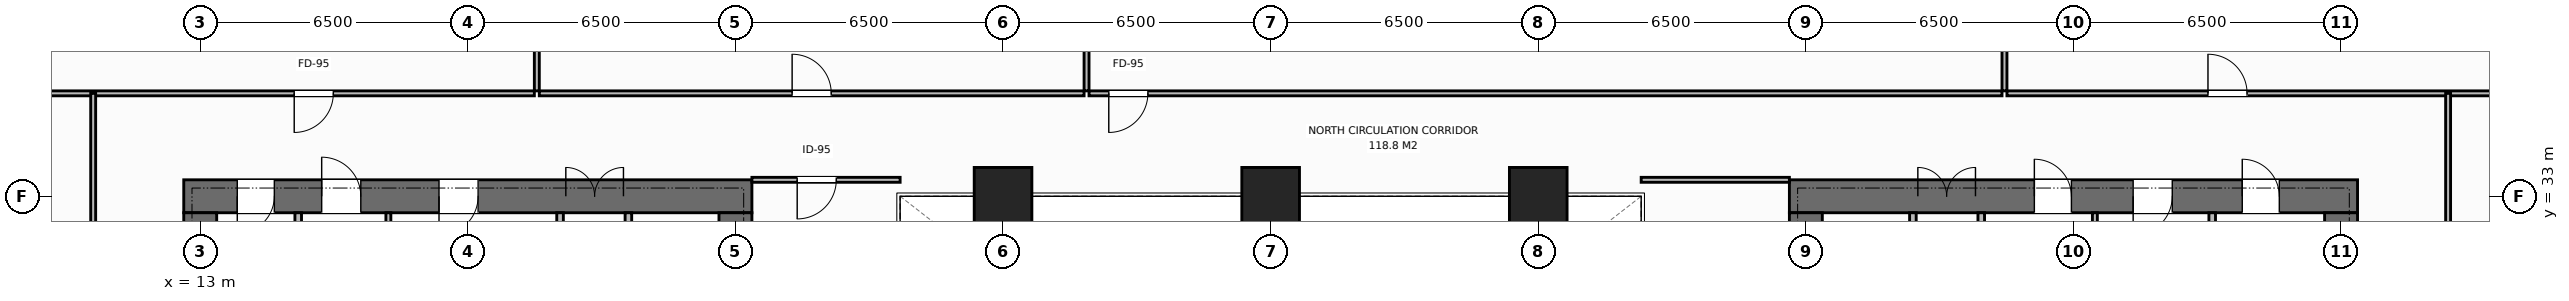
"""IFC4 building model, lengths in metres.
Left out: names, types, materials, properties, quantities, classifications, styles, units other than length and angle.
Written with IfcOpenShell. Run it as: python <this file> out.ifc"""

import sys

from ifc_helpers import new_model, si_unit, direction, frame, frame_2d, origin, origin_2d, place, context, subcontext, project, spatial, rectangle, extrude, element, fill, save


model = new_model("IFC4")
c1 = context("Model", 3, precision=1e-05, world=origin(), true_north=direction((0.0, 1.0)))
c2 = subcontext(c1, "Body", "Model", "MODEL_VIEW")
j1 = project(units=[si_unit("LENGTHUNIT", "METRE"), si_unit("PLANEANGLEUNIT", "RADIAN")], contexts=[c1])
p1 = place(None, origin())
s1 = spatial("IfcSite", under=j1, at=p1, CompositionType="ELEMENT")
p2 = place(p1, origin())
s2 = spatial("IfcBuilding", under=s1, at=p2, CompositionType="ELEMENT")
p3 = place(p2, frame((0.0, 0.0, 69.6)))
s3 = spatial("IfcBuildingStorey", under=s2, at=p3, CompositionType="ELEMENT", Elevation=69.6)
p4 = place(p3, frame((12.6, 33.0, 0.0), z_axis=(0.0, 0.0, 1.0), x_axis=(1.0, 0.0, 0.0)))
e1 = element("IfcWall", 1, at=p4, inside=s3, PredefinedType="SHEAR", context=c2, shape_type="SweptSolid", body=[
    extrude(rectangle(XDim=13.8, YDim=0.8, at=frame_2d((6.9, 0.0))), origin(), (0.0, 0.0, 1.0), 3.8),
])
p5 = place(p4, frame((1.3, 0.0, 0.0)))
e2 = element("IfcOpeningElement", 2, at=p5, cuts=e1, PredefinedType="OPENING", context=c2, shape_type="SweptSolid", body=[
    extrude(rectangle(XDim=0.9, YDim=2.15, at=frame_2d((0.45, 1.075))), frame((0.0, 0.41, 0.0), z_axis=(0.0, -1.0, 0.0), x_axis=(1.0, 0.0, 0.0)), (0.0, 0.0, 1.0), 0.82),
])
p6 = place(p4, frame((3.35, 0.0, 0.0)))
e3 = element("IfcOpeningElement", 3, at=p6, cuts=e1, PredefinedType="OPENING", context=c2, shape_type="SweptSolid", body=[
    extrude(rectangle(XDim=0.95, YDim=2.15, at=frame_2d((0.475, 1.075))), frame((0.0, 0.41, 0.0), z_axis=(0.0, -1.0, 0.0), x_axis=(1.0, 0.0, 0.0)), (0.0, 0.0, 1.0), 0.82),
])
p7 = place(p4, frame((6.2, 0.0, 0.0)))
e4 = element("IfcOpeningElement", 4, at=p7, cuts=e1, PredefinedType="OPENING", context=c2, shape_type="SweptSolid", body=[
    extrude(rectangle(XDim=0.95, YDim=2.15, at=frame_2d((0.475, 1.075))), frame((0.0, 0.41, 0.0), z_axis=(0.0, -1.0, 0.0), x_axis=(1.0, 0.0, 0.0)), (0.0, 0.0, 1.0), 0.82),
])
p8 = place(p4, frame((9.28, 0.0, 0.0)))
e5 = element("IfcOpeningElement", 5, at=p8, cuts=e1, PredefinedType="OPENING", context=c2, shape_type="SweptSolid", body=[
    extrude(rectangle(XDim=1.4, YDim=2.2, at=frame_2d((0.7, 1.1))), frame((0.0, 0.41, 0.0), z_axis=(0.0, -1.0, 0.0), x_axis=(1.0, 0.0, 0.0)), (0.0, 0.0, 1.0), 0.82),
])
p9 = place(p3, frame((13.0, 19.4, 0.0), z_axis=(0.0, 0.0, 1.0), x_axis=(0.0, 1.0, 0.0)))
e6 = element("IfcWall", 6, at=p9, inside=s3, PredefinedType="SHEAR", context=c2, shape_type="SweptSolid", body=[
    extrude(rectangle(XDim=13.2, YDim=0.8, at=frame_2d((6.6, 0.0))), origin(), (0.0, 0.0, 1.0), 3.8),
])
p10 = place(p9, frame((4.65, 0.0, 0.0)))
e7 = element("IfcOpeningElement", 7, at=p10, cuts=e6, PredefinedType="OPENING", context=c2, shape_type="SweptSolid", body=[
    extrude(rectangle(XDim=1.4, YDim=2.2, at=frame_2d((0.7, 1.1))), frame((0.0, 0.41, 0.0), z_axis=(0.0, -1.0, 0.0), x_axis=(1.0, 0.0, 0.0)), (0.0, 0.0, 1.0), 0.82),
])
p11 = place(p3, frame((26.0, 19.4, 0.0), z_axis=(0.0, 0.0, 1.0), x_axis=(0.0, 1.0, 0.0)))
e8 = element("IfcWall", 8, at=p11, inside=s3, PredefinedType="SHEAR", context=c2, shape_type="SweptSolid", body=[
    extrude(rectangle(XDim=13.2, YDim=0.8, at=frame_2d((6.6, 0.0))), origin(), (0.0, 0.0, 1.0), 3.8),
])
p12 = place(p3, frame((51.6, 33.0, 0.0), z_axis=(0.0, 0.0, 1.0), x_axis=(1.0, 0.0, 0.0)))
e9 = element("IfcWall", 9, at=p12, inside=s3, PredefinedType="SHEAR", context=c2, shape_type="SweptSolid", body=[
    extrude(rectangle(XDim=13.8, YDim=0.8, at=frame_2d((6.9, 0.0))), origin(), (0.0, 0.0, 1.0), 3.8),
])
p13 = place(p12, frame((3.12, 0.0, 0.0)))
e10 = element("IfcOpeningElement", 10, at=p13, cuts=e9, PredefinedType="OPENING", context=c2, shape_type="SweptSolid", body=[
    extrude(rectangle(XDim=1.4, YDim=2.2, at=frame_2d((0.7, 1.1))), frame((0.0, 0.41, 0.0), z_axis=(0.0, -1.0, 0.0), x_axis=(1.0, 0.0, 0.0)), (0.0, 0.0, 1.0), 0.82),
])
p14 = place(p12, frame((11.0, 0.0, 0.0)))
e11 = element("IfcOpeningElement", 11, at=p14, cuts=e9, PredefinedType="OPENING", context=c2, shape_type="SweptSolid", body=[
    extrude(rectangle(XDim=0.9, YDim=2.15, at=frame_2d((0.45, 1.075))), frame((0.0, 0.41, 0.0), z_axis=(0.0, -1.0, 0.0), x_axis=(1.0, 0.0, 0.0)), (0.0, 0.0, 1.0), 0.82),
])
p15 = place(p12, frame((5.95, 0.0, 0.0)))
e12 = element("IfcOpeningElement", 12, at=p15, cuts=e9, PredefinedType="OPENING", context=c2, shape_type="SweptSolid", body=[
    extrude(rectangle(XDim=0.9, YDim=2.15, at=frame_2d((0.45, 1.075))), frame((0.0, 0.41, 0.0), z_axis=(0.0, -1.0, 0.0), x_axis=(1.0, 0.0, 0.0)), (0.0, 0.0, 1.0), 0.82),
])
p16 = place(p12, frame((8.35, 0.0, 0.0)))
e13 = element("IfcOpeningElement", 13, at=p16, cuts=e9, PredefinedType="OPENING", context=c2, shape_type="SweptSolid", body=[
    extrude(rectangle(XDim=0.95, YDim=2.15, at=frame_2d((0.475, 1.075))), frame((0.0, 0.41, 0.0), z_axis=(0.0, -1.0, 0.0), x_axis=(1.0, 0.0, 0.0)), (0.0, 0.0, 1.0), 0.82),
])
p17 = place(p3, frame((52.0, 19.4, 0.0), z_axis=(0.0, 0.0, 1.0), x_axis=(0.0, 1.0, 0.0)))
e14 = element("IfcWall", 14, at=p17, inside=s3, PredefinedType="SHEAR", context=c2, shape_type="SweptSolid", body=[
    extrude(rectangle(XDim=13.2, YDim=0.8, at=frame_2d((6.6, 0.0))), origin(), (0.0, 0.0, 1.0), 3.8),
])
p18 = place(p3, frame((65.0, 19.4, 0.0), z_axis=(0.0, 0.0, 1.0), x_axis=(0.0, 1.0, 0.0)))
e15 = element("IfcWall", 15, at=p18, inside=s3, PredefinedType="SHEAR", context=c2, shape_type="SweptSolid", body=[
    extrude(rectangle(XDim=13.2, YDim=0.8, at=frame_2d((6.6, 0.0))), origin(), (0.0, 0.0, 1.0), 3.8),
])
p19 = place(p18, frame((8.05, 0.0, 0.0)))
e16 = element("IfcOpeningElement", 16, at=p19, cuts=e15, PredefinedType="OPENING", context=c2, shape_type="SweptSolid", body=[
    extrude(rectangle(XDim=1.3, YDim=2.2, at=frame_2d((0.65, 1.1))), frame((0.0, 0.41, 0.0), z_axis=(0.0, -1.0, 0.0), x_axis=(1.0, 0.0, 0.0)), (0.0, 0.0, 1.0), 0.82),
])
for number, where, z_axis, x_axis in (
    (17, (32.5, 33.0, 0.0), (0.0, 0.0, 1.0), (1.0, 0.0, 0.0)),
    (18, (39.0, 33.0, 0.0), (0.0, 0.0, 1.0), (1.0, 0.0, 0.0)),
    (19, (45.5, 33.0, 0.0), (0.0, 0.0, 1.0), (1.0, 0.0, 0.0)),
):
    element("IfcColumn", number, at=place(p3, frame(where, z_axis=z_axis, x_axis=x_axis)), inside=s3, PredefinedType="COLUMN", context=c2, shape_type="SweptSolid", body=[
        extrude(rectangle(XDim=1.4, YDim=1.4, at=origin_2d()), origin(), (0.0, 0.0, 1.0), 3.8),
    ])
p20 = place(p3, frame((15.38, 26.56, 0.0), z_axis=(0.0, 0.0, 1.0), x_axis=(0.0, 1.0, 0.0)))
e20 = element("IfcWall", 20, at=p20, inside=s3, PredefinedType="STANDARD", context=c2, shape_type="SweptSolid", body=[
    extrude(rectangle(XDim=6.04, YDim=0.16, at=frame_2d((3.02, 0.0))), origin(), (0.0, 0.0, 1.0), 3.55),
])
p21 = place(p3, frame((17.57, 26.56, 0.0), z_axis=(0.0, 0.0, 1.0), x_axis=(0.0, 1.0, 0.0)))
e21 = element("IfcWall", 21, at=p21, inside=s3, PredefinedType="PARTITIONING", context=c2, shape_type="SweptSolid", body=[
    extrude(rectangle(XDim=6.04, YDim=0.12, at=frame_2d((3.02, 0.0))), origin(), (0.0, 0.0, 1.0), 3.55),
])
p22 = place(p3, frame((21.74, 26.56, 0.0), z_axis=(0.0, 0.0, 1.0), x_axis=(0.0, 1.0, 0.0)))
e22 = element("IfcWall", 22, at=p22, inside=s3, PredefinedType="STANDARD", context=c2, shape_type="SweptSolid", body=[
    extrude(rectangle(XDim=6.04, YDim=0.16, at=frame_2d((3.02, 0.0))), origin(), (0.0, 0.0, 1.0), 3.55),
])
p23 = place(p3, frame((23.4, 19.4, 0.0), z_axis=(0.0, 0.0, 1.0), x_axis=(0.0, 1.0, 0.0)))
e23 = element("IfcWall", 23, at=p23, inside=s3, PredefinedType="STANDARD", context=c2, shape_type="SweptSolid", body=[
    extrude(rectangle(XDim=13.2, YDim=0.16, at=frame_2d((6.6, 0.0))), origin(), (0.0, 0.0, 1.0), 3.55),
])
p24 = place(p23, frame((0.55, 0.0, 0.0)))
e24 = element("IfcOpeningElement", 24, at=p24, cuts=e23, PredefinedType="OPENING", context=c2, shape_type="SweptSolid", body=[
    extrude(rectangle(XDim=1.1, YDim=2.2, at=frame_2d((0.55, 1.1))), frame((0.0, 0.09, 0.0), z_axis=(0.0, -1.0, 0.0), x_axis=(1.0, 0.0, 0.0)), (0.0, 0.0, 1.0), 0.18),
])
p25 = place(p23, frame((2.7, 0.0, 0.0)))
e25 = element("IfcOpeningElement", 25, at=p25, cuts=e23, PredefinedType="OPENING", context=c2, shape_type="SweptSolid", body=[
    extrude(rectangle(XDim=1.1, YDim=2.2, at=frame_2d((0.55, 1.1))), frame((0.0, 0.09, 0.0), z_axis=(0.0, -1.0, 0.0), x_axis=(1.0, 0.0, 0.0)), (0.0, 0.0, 1.0), 0.18),
])
p26 = place(p3, frame((54.6, 19.4, 0.0), z_axis=(0.0, 0.0, 1.0), x_axis=(0.0, 1.0, 0.0)))
e26 = element("IfcWall", 26, at=p26, inside=s3, PredefinedType="STANDARD", context=c2, shape_type="SweptSolid", body=[
    extrude(rectangle(XDim=13.2, YDim=0.16, at=frame_2d((6.6, 0.0))), origin(), (0.0, 0.0, 1.0), 3.55),
])
p27 = place(p26, frame((0.55, 0.0, 0.0)))
e27 = element("IfcOpeningElement", 27, at=p27, cuts=e26, PredefinedType="OPENING", context=c2, shape_type="SweptSolid", body=[
    extrude(rectangle(XDim=1.1, YDim=2.2, at=frame_2d((0.55, 1.1))), frame((0.0, 0.09, 0.0), z_axis=(0.0, -1.0, 0.0), x_axis=(1.0, 0.0, 0.0)), (0.0, 0.0, 1.0), 0.18),
])
p28 = place(p26, frame((2.7, 0.0, 0.0)))
e28 = element("IfcOpeningElement", 28, at=p28, cuts=e26, PredefinedType="OPENING", context=c2, shape_type="SweptSolid", body=[
    extrude(rectangle(XDim=1.1, YDim=2.2, at=frame_2d((0.55, 1.1))), frame((0.0, 0.09, 0.0), z_axis=(0.0, -1.0, 0.0), x_axis=(1.0, 0.0, 0.0)), (0.0, 0.0, 1.0), 0.18),
])
p29 = place(p3, frame((56.26, 23.09, 0.0), z_axis=(0.0, 0.0, 1.0), x_axis=(0.0, 1.0, 0.0)))
e29 = element("IfcWall", 29, at=p29, inside=s3, PredefinedType="STANDARD", context=c2, shape_type="SweptSolid", body=[
    extrude(rectangle(XDim=9.51, YDim=0.16, at=frame_2d((4.755, 0.0))), origin(), (0.0, 0.0, 1.0), 3.55),
])
p30 = place(p29, frame((1.01, 0.0, 0.0)))
e30 = element("IfcOpeningElement", 30, at=p30, cuts=e29, PredefinedType="OPENING", context=c2, shape_type="SweptSolid", body=[
    extrude(rectangle(XDim=1.3, YDim=2.2, at=frame_2d((0.65, 1.1))), frame((0.0, 0.09, 0.0), z_axis=(0.0, -1.0, 0.0), x_axis=(1.0, 0.0, 0.0)), (0.0, 0.0, 1.0), 0.18),
])
p31 = place(p3, frame((61.87, 26.56, 0.0), z_axis=(0.0, 0.0, 1.0), x_axis=(0.0, 1.0, 0.0)))
e31 = element("IfcWall", 31, at=p31, inside=s3, PredefinedType="STANDARD", context=c2, shape_type="SweptSolid", body=[
    extrude(rectangle(XDim=6.04, YDim=0.16, at=frame_2d((3.02, 0.0))), origin(), (0.0, 0.0, 1.0), 3.55),
])
p32 = place(p3, frame((59.02, 26.56, 0.0), z_axis=(0.0, 0.0, 1.0), x_axis=(0.0, 1.0, 0.0)))
e32 = element("IfcWall", 32, at=p32, inside=s3, PredefinedType="PARTITIONING", context=c2, shape_type="SweptSolid", body=[
    extrude(rectangle(XDim=6.04, YDim=0.12, at=frame_2d((3.02, 0.0))), origin(), (0.0, 0.0, 1.0), 3.55),
])
p33 = place(p3, frame((26.4, 33.4, 0.0), z_axis=(0.0, 0.0, 1.0), x_axis=(1.0, 0.0, 0.0)))
e33 = element("IfcWall", 33, at=p33, inside=s3, PredefinedType="PARTITIONING", context=c2, shape_type="SweptSolid", body=[
    extrude(rectangle(XDim=3.6, YDim=0.12, at=frame_2d((1.8, 0.0))), origin(), (0.0, 0.0, 1.0), 3.55),
])
p34 = place(p33, frame((1.1, 0.0, 0.0)))
e34 = element("IfcOpeningElement", 34, at=p34, cuts=e33, PredefinedType="OPENING", context=c2, shape_type="SweptSolid", body=[
    extrude(rectangle(XDim=0.95, YDim=2.15, at=frame_2d((0.475, 1.075))), frame((0.0, 0.07, 0.0), z_axis=(0.0, -1.0, 0.0), x_axis=(1.0, 0.0, 0.0)), (0.0, 0.0, 1.0), 0.14),
])
p35 = place(p3, frame((48.0, 33.4, 0.0), z_axis=(0.0, 0.0, 1.0), x_axis=(1.0, 0.0, 0.0)))
e35 = element("IfcWall", 35, at=p35, inside=s3, PredefinedType="PARTITIONING", context=c2, shape_type="SweptSolid", body=[
    extrude(rectangle(XDim=3.6, YDim=0.12, at=frame_2d((1.8, 0.0))), origin(), (0.0, 0.0, 1.0), 3.55),
])
p36 = place(p3, frame((21.176, 35.56, 0.0), z_axis=(0.0, 0.0, 1.0), x_axis=(0.0, 1.0, 0.0)))
e36 = element("IfcWall", 36, at=p36, inside=s3, PredefinedType="PARTITIONING", context=c2, shape_type="SweptSolid", body=[
    extrude(rectangle(XDim=16.42, YDim=0.12, at=frame_2d((8.21, 0.0))), origin(), (0.0, 0.0, 1.0), 3.55),
])
p37 = place(p3, frame((-0.02, 35.5, 0.0), z_axis=(0.0, 0.0, 1.0), x_axis=(1.0, 0.0, 0.0)))
e37 = element("IfcWall", 37, at=p37, inside=s3, PredefinedType="PARTITIONING", context=c2, shape_type="SweptSolid", body=[
    extrude(rectangle(XDim=21.136, YDim=0.12, at=frame_2d((10.568, 0.0))), origin(), (0.0, 0.0, 1.0), 3.55),
])
p38 = place(p37, frame((15.303, 0.0, 0.0)))
e38 = element("IfcOpeningElement", 38, at=p38, cuts=e37, PredefinedType="OPENING", context=c2, shape_type="SweptSolid", body=[
    extrude(rectangle(XDim=0.95, YDim=2.15, at=frame_2d((0.475, 1.075))), frame((0.0, 0.07, 0.0), z_axis=(0.0, -1.0, 0.0), x_axis=(1.0, 0.0, 0.0)), (0.0, 0.0, 1.0), 0.14),
])
p39 = place(p3, frame((34.528, 35.56, 0.0), z_axis=(0.0, 0.0, 1.0), x_axis=(0.0, 1.0, 0.0)))
e39 = element("IfcWall", 39, at=p39, inside=s3, PredefinedType="PARTITIONING", context=c2, shape_type="SweptSolid", body=[
    extrude(rectangle(XDim=16.42, YDim=0.12, at=frame_2d((8.21, 0.0))), origin(), (0.0, 0.0, 1.0), 3.55),
])
p40 = place(p3, frame((21.236, 35.5, 0.0), z_axis=(0.0, 0.0, 1.0), x_axis=(1.0, 0.0, 0.0)))
e40 = element("IfcWall", 40, at=p40, inside=s3, PredefinedType="PARTITIONING", context=c2, shape_type="SweptSolid", body=[
    extrude(rectangle(XDim=13.233, YDim=0.12, at=frame_2d((6.616, 0.0))), origin(), (0.0, 0.0, 1.0), 3.55),
])
p41 = place(p40, frame((6.141, 0.0, 0.0)))
e41 = element("IfcOpeningElement", 41, at=p41, cuts=e40, PredefinedType="OPENING", context=c2, shape_type="SweptSolid", body=[
    extrude(rectangle(XDim=0.95, YDim=2.15, at=frame_2d((0.475, 1.075))), frame((0.0, 0.07, 0.0), z_axis=(0.0, -1.0, 0.0), x_axis=(1.0, 0.0, 0.0)), (0.0, 0.0, 1.0), 0.14),
])
p42 = place(p3, frame((56.824, 35.56, 0.0), z_axis=(0.0, 0.0, 1.0), x_axis=(0.0, 1.0, 0.0)))
e42 = element("IfcWall", 42, at=p42, inside=s3, PredefinedType="PARTITIONING", context=c2, shape_type="SweptSolid", body=[
    extrude(rectangle(XDim=16.42, YDim=0.12, at=frame_2d((8.21, 0.0))), origin(), (0.0, 0.0, 1.0), 3.55),
])
p43 = place(p3, frame((34.588, 35.5, 0.0), z_axis=(0.0, 0.0, 1.0), x_axis=(1.0, 0.0, 0.0)))
e43 = element("IfcWall", 43, at=p43, inside=s3, PredefinedType="PARTITIONING", context=c2, shape_type="SweptSolid", body=[
    extrude(rectangle(XDim=22.176, YDim=0.12, at=frame_2d((11.088, 0.0))), origin(), (0.0, 0.0, 1.0), 3.55),
])
p44 = place(p43, frame((0.48, 0.0, 0.0)))
e44 = element("IfcOpeningElement", 44, at=p44, cuts=e43, PredefinedType="OPENING", context=c2, shape_type="SweptSolid", body=[
    extrude(rectangle(XDim=0.95, YDim=2.15, at=frame_2d((0.475, 1.075))), frame((0.0, 0.07, 0.0), z_axis=(0.0, -1.0, 0.0), x_axis=(1.0, 0.0, 0.0)), (0.0, 0.0, 1.0), 0.14),
])
p45 = place(p3, frame((56.884, 35.5, 0.0), z_axis=(0.0, 0.0, 1.0), x_axis=(1.0, 0.0, 0.0)))
e45 = element("IfcWall", 45, at=p45, inside=s3, PredefinedType="PARTITIONING", context=c2, shape_type="SweptSolid", body=[
    extrude(rectangle(XDim=21.136, YDim=0.12, at=frame_2d((10.568, 0.0))), origin(), (0.0, 0.0, 1.0), 3.55),
])
p46 = place(p45, frame((4.883, 0.0, 0.0)))
e46 = element("IfcOpeningElement", 46, at=p46, cuts=e45, PredefinedType="OPENING", context=c2, shape_type="SweptSolid", body=[
    extrude(rectangle(XDim=0.95, YDim=2.15, at=frame_2d((0.475, 1.075))), frame((0.0, 0.07, 0.0), z_axis=(0.0, -1.0, 0.0), x_axis=(1.0, 0.0, 0.0)), (0.0, 0.0, 1.0), 0.14),
])
p47 = place(p3, frame((10.4, 18.6, 0.0), z_axis=(0.0, 0.0, 1.0), x_axis=(0.0, 1.0, 0.0)))
e47 = element("IfcWall", 47, at=p47, inside=s3, PredefinedType="PARTITIONING", context=c2, shape_type="SweptSolid", body=[
    extrude(rectangle(XDim=16.9, YDim=0.12, at=frame_2d((8.45, 0.0))), origin(), (0.0, 0.0, 1.0), 3.55),
])
p48 = place(p47, frame((6.925, 0.0, 0.0)))
e48 = element("IfcOpeningElement", 48, at=p48, cuts=e47, PredefinedType="OPENING", context=c2, shape_type="SweptSolid", body=[
    extrude(rectangle(XDim=0.95, YDim=2.15, at=frame_2d((0.475, 1.075))), frame((0.0, 0.07, 0.0), z_axis=(0.0, -1.0, 0.0), x_axis=(1.0, 0.0, 0.0)), (0.0, 0.0, 1.0), 0.14),
])
p49 = place(p3, frame((67.6, 26.0, 0.0), z_axis=(0.0, 0.0, 1.0), x_axis=(0.0, 1.0, 0.0)))
e49 = element("IfcWall", 49, at=p49, inside=s3, PredefinedType="PARTITIONING", context=c2, shape_type="SweptSolid", body=[
    extrude(rectangle(XDim=9.5, YDim=0.12, at=frame_2d((4.75, 0.0))), origin(), (0.0, 0.0, 1.0), 3.55),
])
p50 = place(p49, frame((3.225, 0.0, 0.0)))
e50 = element("IfcOpeningElement", 50, at=p50, cuts=e49, PredefinedType="OPENING", context=c2, shape_type="SweptSolid", body=[
    extrude(rectangle(XDim=0.95, YDim=2.15, at=frame_2d((0.475, 1.075))), frame((0.0, 0.07, 0.0), z_axis=(0.0, -1.0, 0.0), x_axis=(1.0, 0.0, 0.0)), (0.0, 0.0, 1.0), 0.14),
])
p51 = place(p5, origin())
e51 = element("IfcDoor", 51, at=p51, inside=s3, OperationType="SINGLE_SWING_RIGHT", PredefinedType="DOOR", context=c2, shape_type="SweptSolid", body=[
    extrude(rectangle(XDim=0.9, YDim=2.15, at=frame_2d((0.45, 1.075))), frame((0.0, -0.075, 0.0), z_axis=(0.0, -1.0, 0.0), x_axis=(1.0, 0.0, 0.0)), (0.0, 0.0, 1.0), 0.05),
])
fill(e2, e51)
p52 = place(p6, origin())
e52 = element("IfcDoor", 52, at=p52, inside=s3, OperationType="SINGLE_SWING_LEFT", PredefinedType="DOOR", context=c2, shape_type="SweptSolid", body=[
    extrude(rectangle(XDim=0.95, YDim=2.15, at=frame_2d((0.475, 1.075))), frame((0.0, -0.075, 0.0), z_axis=(0.0, -1.0, 0.0), x_axis=(1.0, 0.0, 0.0)), (0.0, 0.0, 1.0), 0.05),
])
fill(e3, e52)
p53 = place(p7, origin())
e53 = element("IfcDoor", 53, at=p53, inside=s3, OperationType="SINGLE_SWING_RIGHT", PredefinedType="DOOR", context=c2, shape_type="SweptSolid", body=[
    extrude(rectangle(XDim=0.95, YDim=2.15, at=frame_2d((0.475, 1.075))), frame((0.0, -0.075, 0.0), z_axis=(0.0, -1.0, 0.0), x_axis=(1.0, 0.0, 0.0)), (0.0, 0.0, 1.0), 0.05),
])
fill(e4, e53)
p54 = place(p8, origin())
e54 = element("IfcDoor", 54, at=p54, inside=s3, OperationType="DOUBLE_DOOR_SINGLE_SWING", PredefinedType="DOOR", context=c2, shape_type="SweptSolid", body=[
    extrude(rectangle(XDim=1.4, YDim=2.2, at=frame_2d((0.7, 1.1))), frame((0.0, -0.075, 0.0), z_axis=(0.0, -1.0, 0.0), x_axis=(1.0, 0.0, 0.0)), (0.0, 0.0, 1.0), 0.05),
])
fill(e5, e54)
p55 = place(p13, origin())
e55 = element("IfcDoor", 55, at=p55, inside=s3, OperationType="DOUBLE_DOOR_SINGLE_SWING", PredefinedType="DOOR", context=c2, shape_type="SweptSolid", body=[
    extrude(rectangle(XDim=1.4, YDim=2.2, at=frame_2d((0.7, 1.1))), frame((0.0, -0.075, 0.0), z_axis=(0.0, -1.0, 0.0), x_axis=(1.0, 0.0, 0.0)), (0.0, 0.0, 1.0), 0.05),
])
fill(e10, e55)
p56 = place(p14, origin())
e56 = element("IfcDoor", 56, at=p56, inside=s3, OperationType="SINGLE_SWING_LEFT", PredefinedType="DOOR", context=c2, shape_type="SweptSolid", body=[
    extrude(rectangle(XDim=0.9, YDim=2.15, at=frame_2d((0.45, 1.075))), frame((0.0, -0.075, 0.0), z_axis=(0.0, -1.0, 0.0), x_axis=(1.0, 0.0, 0.0)), (0.0, 0.0, 1.0), 0.05),
])
fill(e11, e56)
p57 = place(p15, origin())
e57 = element("IfcDoor", 57, at=p57, inside=s3, OperationType="SINGLE_SWING_LEFT", PredefinedType="DOOR", context=c2, shape_type="SweptSolid", body=[
    extrude(rectangle(XDim=0.9, YDim=2.15, at=frame_2d((0.45, 1.075))), frame((0.0, -0.075, 0.0), z_axis=(0.0, -1.0, 0.0), x_axis=(1.0, 0.0, 0.0)), (0.0, 0.0, 1.0), 0.05),
])
fill(e12, e57)
p58 = place(p16, origin())
e58 = element("IfcDoor", 58, at=p58, inside=s3, OperationType="SINGLE_SWING_RIGHT", PredefinedType="DOOR", context=c2, shape_type="SweptSolid", body=[
    extrude(rectangle(XDim=0.95, YDim=2.15, at=frame_2d((0.475, 1.075))), frame((0.0, -0.075, 0.0), z_axis=(0.0, -1.0, 0.0), x_axis=(1.0, 0.0, 0.0)), (0.0, 0.0, 1.0), 0.05),
])
fill(e13, e58)
p59 = place(p34, origin())
e59 = element("IfcDoor", 59, at=p59, inside=s3, OperationType="SINGLE_SWING_RIGHT", PredefinedType="DOOR", context=c2, shape_type="SweptSolid", body=[
    extrude(rectangle(XDim=0.95, YDim=2.15, at=frame_2d((0.475, 1.075))), frame((0.0, 0.025, 0.0), z_axis=(0.0, -1.0, 0.0), x_axis=(1.0, 0.0, 0.0)), (0.0, 0.0, 1.0), 0.05),
])
fill(e34, e59)
p60 = place(p38, origin())
e60 = element("IfcDoor", 60, at=p60, inside=s3, OperationType="SINGLE_SWING_RIGHT", PredefinedType="DOOR", context=c2, shape_type="SweptSolid", body=[
    extrude(rectangle(XDim=0.95, YDim=2.15, at=frame_2d((0.475, 1.075))), frame((0.0, 0.025, 0.0), z_axis=(0.0, -1.0, 0.0), x_axis=(1.0, 0.0, 0.0)), (0.0, 0.0, 1.0), 0.05),
])
fill(e38, e60)
p61 = place(p41, origin())
e61 = element("IfcDoor", 61, at=p61, inside=s3, OperationType="SINGLE_SWING_LEFT", PredefinedType="DOOR", context=c2, shape_type="SweptSolid", body=[
    extrude(rectangle(XDim=0.95, YDim=2.15, at=frame_2d((0.475, 1.075))), frame((0.0, 0.025, 0.0), z_axis=(0.0, -1.0, 0.0), x_axis=(1.0, 0.0, 0.0)), (0.0, 0.0, 1.0), 0.05),
])
fill(e41, e61)
p62 = place(p44, origin())
e62 = element("IfcDoor", 62, at=p62, inside=s3, OperationType="SINGLE_SWING_RIGHT", PredefinedType="DOOR", context=c2, shape_type="SweptSolid", body=[
    extrude(rectangle(XDim=0.95, YDim=2.15, at=frame_2d((0.475, 1.075))), frame((0.0, 0.025, 0.0), z_axis=(0.0, -1.0, 0.0), x_axis=(1.0, 0.0, 0.0)), (0.0, 0.0, 1.0), 0.05),
])
fill(e44, e62)
p63 = place(p46, origin())
e63 = element("IfcDoor", 63, at=p63, inside=s3, OperationType="SINGLE_SWING_LEFT", PredefinedType="DOOR", context=c2, shape_type="SweptSolid", body=[
    extrude(rectangle(XDim=0.95, YDim=2.15, at=frame_2d((0.475, 1.075))), frame((0.0, 0.025, 0.0), z_axis=(0.0, -1.0, 0.0), x_axis=(1.0, 0.0, 0.0)), (0.0, 0.0, 1.0), 0.05),
])
fill(e46, e63)
save(model, sys.argv[1])
